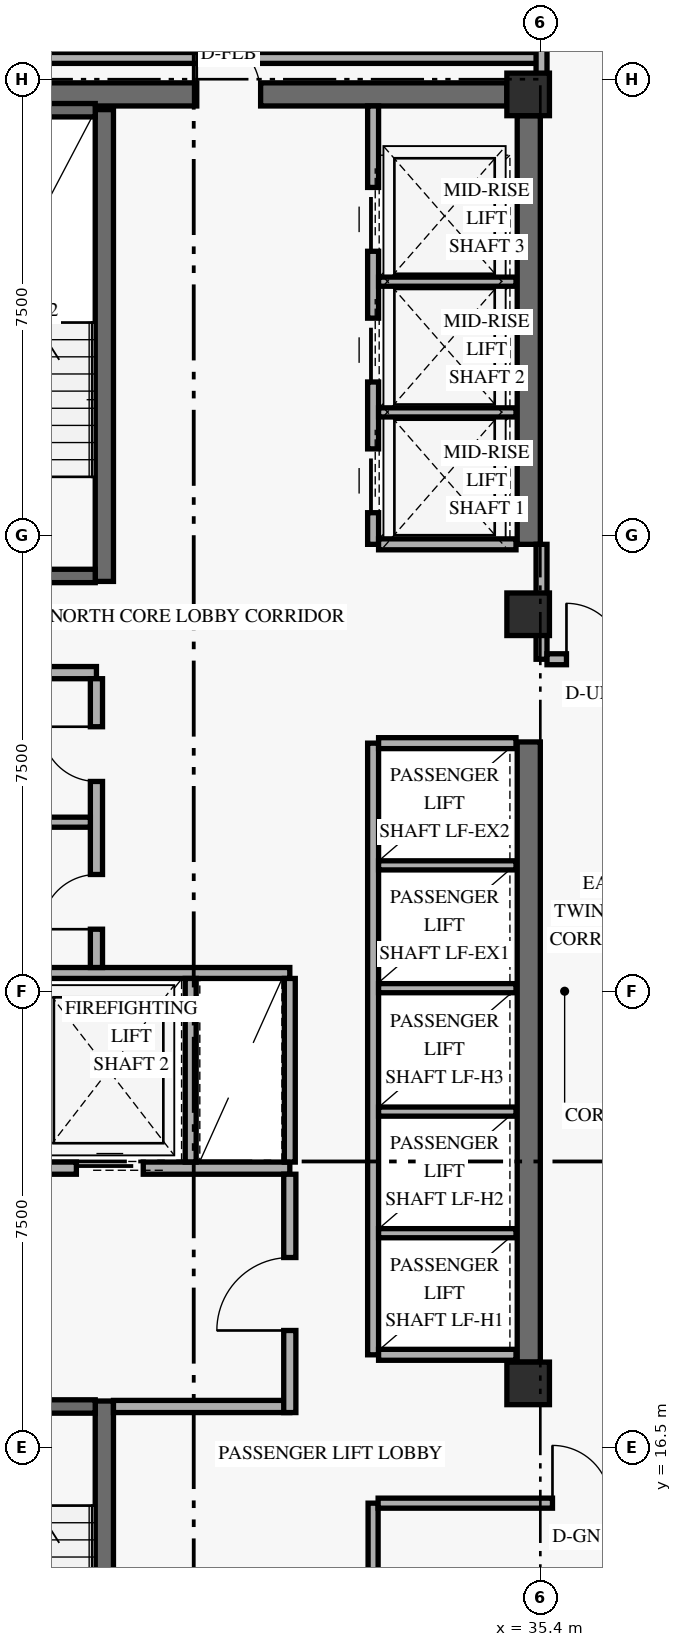
"""IFC4 building model, lengths in metres.
Left out: names, types, materials, properties, quantities, classifications, styles, units other than length and angle.
Written with IfcOpenShell. Run it as: python <this file> out.ifc"""

import sys

from ifc_helpers import new_model, si_unit, direction, frame, frame_2d, origin, origin_2d, place, context, subcontext, project, spatial, rectangle, extrude, element, fill, save


model = new_model("IFC4")
c1 = context("Model", 3, precision=1e-05, world=origin(), true_north=direction((0.0, 1.0)))
c2 = subcontext(c1, "Body", "Model", "MODEL_VIEW")
j1 = project(units=[si_unit("LENGTHUNIT", "METRE"), si_unit("PLANEANGLEUNIT", "RADIAN")], contexts=[c1])
p1 = place(None, origin())
s1 = spatial("IfcSite", under=j1, at=p1, CompositionType="ELEMENT")
p2 = place(p1, origin())
s2 = spatial("IfcBuilding", under=s1, at=p2, CompositionType="ELEMENT")
p3 = place(p2, frame((0.0, 0.0, 148.2)))
s3 = spatial("IfcBuildingStorey", under=s2, at=p3, CompositionType="ELEMENT", Elevation=148.2)
p4 = place(p3, frame((35.21, 17.9, 0.0), z_axis=(0.0, 0.0, 1.0), x_axis=(0.0, 1.0, 0.0)))
e1 = element("IfcWall", 1, at=p4, inside=s3, PredefinedType="SHEAR", context=c2, shape_type="SweptSolid", body=[
    extrude(rectangle(XDim=10.2, YDim=0.38, at=frame_2d((5.1, 0.0))), origin(), (0.0, 0.0, 1.0), 2.748),
])
p5 = place(p3, frame((35.21, 31.35, 0.0), z_axis=(0.0, 0.0, 1.0), x_axis=(0.0, 1.0, 0.0)))
e2 = element("IfcWall", 2, at=p5, inside=s3, PredefinedType="SHEAR", context=c2, shape_type="SweptSolid", body=[
    extrude(rectangle(XDim=7.05, YDim=0.38, at=frame_2d((3.525, 0.0))), origin(), (0.0, 0.0, 1.0), 2.748),
])
p6 = place(p3, frame((24.55, 38.75, 0.0), z_axis=(0.0, 0.0, 1.0), x_axis=(1.0, 0.0, 0.0)))
e3 = element("IfcWall", 3, at=p6, inside=s3, PredefinedType="SHEAR", context=c2, shape_type="SweptSolid", body=[
    extrude(rectangle(XDim=10.3, YDim=0.38, at=frame_2d((5.15, 0.0))), origin(), (0.0, 0.0, 1.0), 3.36),
])
p7 = place(p6, frame((5.2, 0.0, 0.0)))
e4 = element("IfcOpeningElement", 4, at=p7, cuts=e3, PredefinedType="OPENING", context=c2, shape_type="SweptSolid", body=[
    extrude(rectangle(XDim=1.05, YDim=2.15, at=frame_2d((0.525, 1.075))), frame((0.0, 0.2, 0.0), z_axis=(0.0, -1.0, 0.0), x_axis=(1.0, 0.0, 0.0)), (0.0, 0.0, 1.0), 0.4),
])
p8 = place(p3, frame((28.23, 9.5, 0.0), z_axis=(0.0, 0.0, 1.0), x_axis=(0.0, 1.0, 0.0)))
e5 = element("IfcWall", 5, at=p8, inside=s3, PredefinedType="SHEAR", context=c2, shape_type="SweptSolid", body=[
    extrude(rectangle(XDim=7.76, YDim=0.3, at=frame_2d((3.88, 0.0))), origin(), (0.0, 0.0, 1.0), 3.36),
])
p9 = place(p3, frame((24.92, 17.17, 0.0), z_axis=(0.0, 0.0, 1.0), x_axis=(1.0, 0.0, 0.0)))
e6 = element("IfcWall", 6, at=p9, inside=s3, PredefinedType="SHEAR", context=c2, shape_type="SweptSolid", body=[
    extrude(rectangle(XDim=3.16, YDim=0.22, at=frame_2d((1.58, 0.0))), origin(), (0.0, 0.0, 1.0), 3.36),
])
p10 = place(p9, frame((0.78, 0.0, 0.0)))
e7 = element("IfcOpeningElement", 7, at=p10, cuts=e6, PredefinedType="OPENING", context=c2, shape_type="SweptSolid", body=[
    extrude(rectangle(XDim=1.05, YDim=2.15, at=frame_2d((0.525, 1.075))), frame((0.0, 0.12, 0.0), z_axis=(0.0, -1.0, 0.0), x_axis=(1.0, 0.0, 0.0)), (0.0, 0.0, 1.0), 0.24),
])
p11 = place(p3, frame((28.23, 30.74, 0.0), z_axis=(0.0, 0.0, 1.0), x_axis=(0.0, 1.0, 0.0)))
e8 = element("IfcWall", 8, at=p11, inside=s3, PredefinedType="SHEAR", context=c2, shape_type="SweptSolid", body=[
    extrude(rectangle(XDim=7.76, YDim=0.3, at=frame_2d((3.88, 0.0))), origin(), (0.0, 0.0, 1.0), 3.36),
])
p12 = place(p3, frame((24.92, 30.83, 0.0), z_axis=(0.0, 0.0, 1.0), x_axis=(1.0, 0.0, 0.0)))
e9 = element("IfcWall", 9, at=p12, inside=s3, PredefinedType="SHEAR", context=c2, shape_type="SweptSolid", body=[
    extrude(rectangle(XDim=3.16, YDim=0.22, at=frame_2d((1.58, 0.0))), origin(), (0.0, 0.0, 1.0), 3.36),
])
p13 = place(p12, frame((0.78, 0.0, 0.0)))
e10 = element("IfcOpeningElement", 10, at=p13, cuts=e9, PredefinedType="OPENING", context=c2, shape_type="SweptSolid", body=[
    extrude(rectangle(XDim=1.05, YDim=2.15, at=frame_2d((0.525, 1.075))), frame((0.0, 0.12, 0.0), z_axis=(0.0, -1.0, 0.0), x_axis=(1.0, 0.0, 0.0)), (0.0, 0.0, 1.0), 0.24),
])
p14 = place(p3, frame((24.92, 38.49, 0.0), z_axis=(0.0, 0.0, 1.0), x_axis=(1.0, 0.0, 0.0)))
e11 = element("IfcWall", 11, at=p14, inside=s3, PredefinedType="SHEAR", context=c2, shape_type="SweptSolid", body=[
    extrude(rectangle(XDim=3.16, YDim=0.22, at=frame_2d((1.58, 0.0))), origin(), (0.0, 0.0, 1.0), 3.36),
])
for number, where, z_axis, x_axis in (
    (12, (35.2, 17.55, 0.0), (0.0, 0.0, 1.0), (1.0, 0.0, 0.0)),
    (13, (35.2, 30.2, 0.0), (0.0, 0.0, 1.0), (1.0, 0.0, 0.0)),
    (14, (35.2, 38.75, 0.0), (0.0, 0.0, 1.0), (1.0, 0.0, 0.0)),
):
    element("IfcColumn", number, at=place(p3, frame(where, z_axis=z_axis, x_axis=x_axis)), inside=s3, PredefinedType="COLUMN", context=c2, shape_type="SweptSolid", body=[
        extrude(rectangle(XDim=0.7, YDim=0.7, at=origin_2d()), origin(), (0.0, 0.0, 1.0), 3.6),
    ])
p15 = place(p3, frame((24.45, 21.09, 0.0), z_axis=(0.0, 0.0, 1.0), x_axis=(1.0, 0.0, 0.0)))
e15 = element("IfcWall", 15, at=p15, inside=s3, PredefinedType="STANDARD", context=c2, shape_type="SweptSolid", body=[
    extrude(rectangle(XDim=6.83, YDim=0.2, at=frame_2d((3.415, 0.0))), origin(), (0.0, 0.0, 1.0), 3.36),
])
p16 = place(p15, frame((0.72, 0.0, 0.0)))
e16 = element("IfcOpeningElement", 16, at=p16, cuts=e15, PredefinedType="OPENING", context=c2, shape_type="SweptSolid", body=[
    extrude(rectangle(XDim=1.1, YDim=2.2, at=frame_2d((0.55, 1.1))), frame((0.0, 0.11, 0.0), z_axis=(0.0, -1.0, 0.0), x_axis=(1.0, 0.0, 0.0)), (0.0, 0.0, 1.0), 0.22),
])
p17 = place(p15, frame((3.32, 0.0, 0.0)))
e17 = element("IfcOpeningElement", 17, at=p17, cuts=e15, PredefinedType="OPENING", context=c2, shape_type="SweptSolid", body=[
    extrude(rectangle(XDim=1.1, YDim=2.2, at=frame_2d((0.55, 1.1))), frame((0.0, 0.11, 0.0), z_axis=(0.0, -1.0, 0.0), x_axis=(1.0, 0.0, 0.0)), (0.0, 0.0, 1.0), 0.22),
])
p18 = place(p3, frame((28.38, 17.17, 0.0), z_axis=(0.0, 0.0, 1.0), x_axis=(1.0, 0.0, 0.0)))
e18 = element("IfcWall", 18, at=p18, inside=s3, PredefinedType="STANDARD", context=c2, shape_type="SweptSolid", body=[
    extrude(rectangle(XDim=2.9, YDim=0.2, at=frame_2d((1.45, 0.0))), origin(), (0.0, 0.0, 1.0), 3.36),
])
p19 = place(p3, frame((31.28, 17.07, 0.0), z_axis=(0.0, 0.0, 1.0), x_axis=(0.0, 1.0, 0.0)))
e19 = element("IfcWall", 19, at=p19, inside=s3, PredefinedType="STANDARD", context=c2, shape_type="SweptSolid", body=[
    extrude(rectangle(XDim=3.92, YDim=0.2, at=frame_2d((1.96, 0.0))), origin(), (0.0, 0.0, 1.0), 2.73),
])
p20 = place(p19, frame((1.35, 0.0, 0.0)))
e20 = element("IfcOpeningElement", 20, at=p20, cuts=e19, PredefinedType="OPENING", context=c2, shape_type="SweptSolid", body=[
    extrude(rectangle(XDim=1.2, YDim=2.15, at=frame_2d((0.6, 1.075))), frame((0.0, 0.11, 0.0), z_axis=(0.0, -1.0, 0.0), x_axis=(1.0, 0.0, 0.0)), (0.0, 0.0, 1.0), 0.22),
])
p21 = place(p3, frame((24.45, 24.3, 0.0), z_axis=(0.0, 0.0, 1.0), x_axis=(1.0, 0.0, 0.0)))
e21 = element("IfcWall", 21, at=p21, inside=s3, PredefinedType="STANDARD", context=c2, shape_type="SweptSolid", body=[
    extrude(rectangle(XDim=6.83, YDim=0.18, at=frame_2d((3.415, 0.0))), origin(), (0.0, 0.0, 1.0), 3.36),
])
for number, where, z_axis, x_axis in (
    (22, (29.65, 21.19, 0.0), (0.0, 0.0, 1.0), (0.0, 1.0, 0.0)),
    (23, (31.28, 21.19, 0.0), (0.0, 0.0, 1.0), (0.0, 1.0, 0.0)),
):
    element("IfcWall", number, at=place(p3, frame(where, z_axis=z_axis, x_axis=x_axis)), inside=s3, PredefinedType="STANDARD", context=c2, shape_type="SweptSolid", body=[
        extrude(rectangle(XDim=3.02, YDim=0.18, at=frame_2d((1.51, 0.0))), origin(), (0.0, 0.0, 1.0), 3.36),
    ])
p22 = place(p3, frame((24.45, 29.24, 0.0), z_axis=(0.0, 0.0, 1.0), x_axis=(1.0, 0.0, 0.0)))
e24 = element("IfcWall", 24, at=p22, inside=s3, PredefinedType="STANDARD", context=c2, shape_type="SweptSolid", body=[
    extrude(rectangle(XDim=3.65, YDim=0.2, at=frame_2d((1.825, 0.0))), origin(), (0.0, 0.0, 1.0), 3.36),
])
p23 = place(p3, frame((28.1, 24.39, 0.0), z_axis=(0.0, 0.0, 1.0), x_axis=(0.0, 1.0, 0.0)))
e25 = element("IfcWall", 25, at=p23, inside=s3, PredefinedType="STANDARD", context=c2, shape_type="SweptSolid", body=[
    extrude(rectangle(XDim=4.75, YDim=0.2, at=frame_2d((2.375, 0.0))), origin(), (0.0, 0.0, 1.0), 3.36),
])
p24 = place(p23, frame((0.63, 0.0, 0.0)))
e26 = element("IfcOpeningElement", 26, at=p24, cuts=e25, PredefinedType="OPENING", context=c2, shape_type="SweptSolid", body=[
    extrude(rectangle(XDim=0.9, YDim=2.1, at=frame_2d((0.45, 1.05))), frame((0.0, 0.11, 0.0), z_axis=(0.0, -1.0, 0.0), x_axis=(1.0, 0.0, 0.0)), (0.0, 0.0, 1.0), 0.22),
])
p25 = place(p23, frame((3.06, 0.0, 0.0)))
e27 = element("IfcOpeningElement", 27, at=p25, cuts=e25, PredefinedType="OPENING", context=c2, shape_type="SweptSolid", body=[
    extrude(rectangle(XDim=0.9, YDim=2.1, at=frame_2d((0.45, 1.05))), frame((0.0, 0.11, 0.0), z_axis=(0.0, -1.0, 0.0), x_axis=(1.0, 0.0, 0.0)), (0.0, 0.0, 1.0), 0.22),
])
p26 = place(p3, frame((24.45, 26.78, 0.0), z_axis=(0.0, 0.0, 1.0), x_axis=(1.0, 0.0, 0.0)))
e28 = element("IfcWall", 28, at=p26, inside=s3, PredefinedType="PARTITIONING", context=c2, shape_type="SweptSolid", body=[
    extrude(rectangle(XDim=3.55, YDim=0.165, at=frame_2d((1.775, 0.0))), origin(), (0.0, 0.0, 1.0), 3.36),
])
p27 = place(p3, frame((32.65, 18.02, 0.0), z_axis=(0.0, 0.0, 1.0), x_axis=(0.0, 1.0, 0.0)))
e29 = element("IfcWall", 29, at=p27, inside=s3, PredefinedType="STANDARD", context=c2, shape_type="SweptSolid", body=[
    extrude(rectangle(XDim=10.06, YDim=0.18, at=frame_2d((5.03, 0.0))), origin(), (0.0, 0.0, 1.0), 3.36),
])
for number, where, z_axis, x_axis in (
    (30, (32.74, 18.02, 0.0), (0.0, 0.0, 1.0), (1.0, 0.0, 0.0)),
    (31, (32.74, 28.08, 0.0), (0.0, 0.0, 1.0), (1.0, 0.0, 0.0)),
):
    element("IfcWall", number, at=place(p3, frame(where, z_axis=z_axis, x_axis=x_axis)), inside=s3, PredefinedType="STANDARD", context=c2, shape_type="SweptSolid", body=[
        extrude(rectangle(XDim=2.26, YDim=0.18, at=frame_2d((1.13, 0.0))), origin(), (0.0, 0.0, 1.0), 3.36),
    ])
for number, where, z_axis, x_axis in (
    (32, (32.74, 20.02, 0.0), (0.0, 0.0, 1.0), (1.0, 0.0, 0.0)),
    (33, (32.74, 22.02, 0.0), (0.0, 0.0, 1.0), (1.0, 0.0, 0.0)),
    (34, (32.74, 24.05, 0.0), (0.0, 0.0, 1.0), (1.0, 0.0, 0.0)),
    (35, (32.74, 26.07, 0.0), (0.0, 0.0, 1.0), (1.0, 0.0, 0.0)),
):
    element("IfcWall", number, at=place(p3, frame(where, z_axis=z_axis, x_axis=x_axis)), inside=s3, PredefinedType="STANDARD", context=c2, shape_type="SweptSolid", body=[
        extrude(rectangle(XDim=2.26, YDim=0.15, at=frame_2d((1.13, 0.0))), origin(), (0.0, 0.0, 1.0), 3.36),
    ])
p28 = place(p3, frame((32.65, 31.35, 0.0), z_axis=(0.0, 0.0, 1.0), x_axis=(0.0, 1.0, 0.0)))
e36 = element("IfcWall", 36, at=p28, inside=s3, PredefinedType="STANDARD", context=c2, shape_type="SweptSolid", body=[
    extrude(rectangle(XDim=7.21, YDim=0.18, at=frame_2d((3.605, 0.0))), origin(), (0.0, 0.0, 1.0), 3.36),
])
p29 = place(p28, frame((0.52, 0.0, 0.0)))
e37 = element("IfcOpeningElement", 37, at=p29, cuts=e36, PredefinedType="OPENING", context=c2, shape_type="SweptSolid", body=[
    extrude(rectangle(XDim=1.05, YDim=2.2, at=frame_2d((0.525, 1.1))), frame((0.0, 0.1, 0.0), z_axis=(0.0, -1.0, 0.0), x_axis=(1.0, 0.0, 0.0)), (0.0, 0.0, 1.0), 0.2),
])
p30 = place(p28, frame((2.67, 0.0, 0.0)))
e38 = element("IfcOpeningElement", 38, at=p30, cuts=e36, PredefinedType="OPENING", context=c2, shape_type="SweptSolid", body=[
    extrude(rectangle(XDim=1.05, YDim=2.2, at=frame_2d((0.525, 1.1))), frame((0.0, 0.1, 0.0), z_axis=(0.0, -1.0, 0.0), x_axis=(1.0, 0.0, 0.0)), (0.0, 0.0, 1.0), 0.2),
])
p31 = place(p28, frame((4.82, 0.0, 0.0)))
e39 = element("IfcOpeningElement", 39, at=p31, cuts=e36, PredefinedType="OPENING", context=c2, shape_type="SweptSolid", body=[
    extrude(rectangle(XDim=1.05, YDim=2.2, at=frame_2d((0.525, 1.1))), frame((0.0, 0.1, 0.0), z_axis=(0.0, -1.0, 0.0), x_axis=(1.0, 0.0, 0.0)), (0.0, 0.0, 1.0), 0.2),
])
p32 = place(p3, frame((32.74, 31.35, 0.0), z_axis=(0.0, 0.0, 1.0), x_axis=(1.0, 0.0, 0.0)))
e40 = element("IfcWall", 40, at=p32, inside=s3, PredefinedType="STANDARD", context=c2, shape_type="SweptSolid", body=[
    extrude(rectangle(XDim=2.26, YDim=0.18, at=frame_2d((1.13, 0.0))), origin(), (0.0, 0.0, 1.0), 3.36),
])
for number, where, z_axis, x_axis in (
    (41, (32.74, 33.52, 0.0), (0.0, 0.0, 1.0), (1.0, 0.0, 0.0)),
    (42, (32.74, 35.67, 0.0), (0.0, 0.0, 1.0), (1.0, 0.0, 0.0)),
):
    element("IfcWall", number, at=place(p3, frame(where, z_axis=z_axis, x_axis=x_axis)), inside=s3, PredefinedType="STANDARD", context=c2, shape_type="SweptSolid", body=[
        extrude(rectangle(XDim=2.26, YDim=0.15, at=frame_2d((1.13, 0.0))), origin(), (0.0, 0.0, 1.0), 3.36),
    ])
p33 = place(p3, frame((32.65, 9.5, 0.0), z_axis=(0.0, 0.0, 1.0), x_axis=(0.0, 1.0, 0.0)))
e43 = element("IfcWall", 43, at=p33, inside=s3, PredefinedType="PARTITIONING", context=c2, shape_type="SweptSolid", body=[
    extrude(rectangle(XDim=6.08, YDim=0.165, at=frame_2d((3.04, 0.0))), origin(), (0.0, 0.0, 1.0), 3.36),
])
p34 = place(p3, frame((32.732, 15.58, 0.0), z_axis=(0.0, 0.0, 1.0), x_axis=(1.0, 0.0, 0.0)))
e44 = element("IfcWall", 44, at=p34, inside=s3, PredefinedType="PARTITIONING", context=c2, shape_type="SweptSolid", body=[
    extrude(rectangle(XDim=5.618, YDim=0.165, at=frame_2d((2.809, 0.0))), origin(), (0.0, 0.0, 1.0), 2.73),
])
p35 = place(p34, frame((2.867, 0.0, 0.0)))
e45 = element("IfcOpeningElement", 45, at=p35, cuts=e44, PredefinedType="OPENING", context=c2, shape_type="SweptSolid", body=[
    extrude(rectangle(XDim=0.95, YDim=2.15, at=frame_2d((0.475, 1.075))), frame((0.0, 0.093, 0.0), z_axis=(0.0, -1.0, 0.0), x_axis=(1.0, 0.0, 0.0)), (0.0, 0.0, 1.0), 0.185),
])
p36 = place(p3, frame((35.42, 29.46, 0.0), z_axis=(0.0, 0.0, 1.0), x_axis=(0.0, 1.0, 0.0)))
e46 = element("IfcWall", 46, at=p36, inside=s3, PredefinedType="STANDARD", context=c2, shape_type="SweptSolid", body=[
    extrude(rectangle(XDim=1.89, YDim=0.18, at=frame_2d((0.945, 0.0))), origin(), (0.0, 0.0, 1.0), 2.73),
])
p37 = place(p3, frame((35.51, 29.46, 0.0), z_axis=(0.0, 0.0, 1.0), x_axis=(1.0, 0.0, 0.0)))
e47 = element("IfcWall", 47, at=p37, inside=s3, PredefinedType="STANDARD", context=c2, shape_type="SweptSolid", body=[
    extrude(rectangle(XDim=12.49, YDim=0.18, at=frame_2d((6.245, 0.0))), origin(), (0.0, 0.0, 1.0), 2.73),
])
p38 = place(p37, frame((0.32, 0.0, 0.0)))
e48 = element("IfcOpeningElement", 48, at=p38, cuts=e47, PredefinedType="OPENING", context=c2, shape_type="SweptSolid", body=[
    extrude(rectangle(XDim=0.92, YDim=2.15, at=frame_2d((0.46, 1.075))), frame((0.0, 0.1, 0.0), z_axis=(0.0, -1.0, 0.0), x_axis=(1.0, 0.0, 0.0)), (0.0, 0.0, 1.0), 0.2),
])
p39 = place(p3, frame((23.85, 39.35, 0.0), z_axis=(0.0, 0.0, 1.0), x_axis=(1.0, 0.0, 0.0)))
e49 = element("IfcWall", 49, at=p39, inside=s3, PredefinedType="STANDARD", context=c2, shape_type="SweptSolid", body=[
    extrude(rectangle(XDim=11.57, YDim=0.18, at=frame_2d((5.785, 0.0))), origin(), (0.0, 0.0, 1.0), 2.73),
])
p40 = place(p3, frame((35.42, 38.75, 0.0), z_axis=(0.0, 0.0, 1.0), x_axis=(0.0, 1.0, 0.0)))
e50 = element("IfcWall", 50, at=p40, inside=s3, PredefinedType="PARTITIONING", context=c2, shape_type="SweptSolid", body=[
    extrude(rectangle(XDim=4.97, YDim=0.18, at=frame_2d((2.485, 0.0))), origin(), (0.0, 0.0, 1.0), 2.73),
])
p41 = place(p17, origin())
e51 = element("IfcDoor", 51, at=p41, inside=s3, OperationType="SLIDING_TO_LEFT", PredefinedType="DOOR", context=c2, shape_type="SweptSolid", body=[
    extrude(rectangle(XDim=1.1, YDim=2.2, at=frame_2d((0.55, 1.1))), frame((0.0, 0.025, 0.0), z_axis=(0.0, -1.0, 0.0), x_axis=(1.0, 0.0, 0.0)), (0.0, 0.0, 1.0), 0.05),
])
fill(e17, e51)
p42 = place(p20, origin())
e52 = element("IfcDoor", 52, at=p42, inside=s3, OperationType="SINGLE_SWING_LEFT", PredefinedType="DOOR", context=c2, shape_type="SweptSolid", body=[
    extrude(rectangle(XDim=1.2, YDim=2.15, at=frame_2d((0.6, 1.075))), frame((0.0, 0.025, 0.0), z_axis=(0.0, -1.0, 0.0), x_axis=(1.0, 0.0, 0.0)), (0.0, 0.0, 1.0), 0.05),
])
fill(e20, e52)
p43 = place(p24, origin())
e53 = element("IfcDoor", 53, at=p43, inside=s3, OperationType="SINGLE_SWING_LEFT", PredefinedType="DOOR", context=c2, shape_type="SweptSolid", body=[
    extrude(rectangle(XDim=0.9, YDim=2.1, at=frame_2d((0.45, 1.05))), frame((0.0, 0.025, 0.0), z_axis=(0.0, -1.0, 0.0), x_axis=(1.0, 0.0, 0.0)), (0.0, 0.0, 1.0), 0.05),
])
fill(e26, e53)
p44 = place(p25, origin())
e54 = element("IfcDoor", 54, at=p44, inside=s3, OperationType="SINGLE_SWING_RIGHT", PredefinedType="DOOR", context=c2, shape_type="SweptSolid", body=[
    extrude(rectangle(XDim=0.9, YDim=2.1, at=frame_2d((0.45, 1.05))), frame((0.0, 0.025, 0.0), z_axis=(0.0, -1.0, 0.0), x_axis=(1.0, 0.0, 0.0)), (0.0, 0.0, 1.0), 0.05),
])
fill(e27, e54)
p45 = place(p29, origin())
e55 = element("IfcDoor", 55, at=p45, inside=s3, OperationType="SLIDING_TO_LEFT", PredefinedType="DOOR", context=c2, shape_type="SweptSolid", body=[
    extrude(rectangle(XDim=1.05, YDim=2.2, at=frame_2d((0.525, 1.1))), frame((0.0, 0.025, 0.0), z_axis=(0.0, -1.0, 0.0), x_axis=(1.0, 0.0, 0.0)), (0.0, 0.0, 1.0), 0.05),
])
fill(e37, e55)
p46 = place(p30, origin())
e56 = element("IfcDoor", 56, at=p46, inside=s3, OperationType="SLIDING_TO_LEFT", PredefinedType="DOOR", context=c2, shape_type="SweptSolid", body=[
    extrude(rectangle(XDim=1.05, YDim=2.2, at=frame_2d((0.525, 1.1))), frame((0.0, 0.025, 0.0), z_axis=(0.0, -1.0, 0.0), x_axis=(1.0, 0.0, 0.0)), (0.0, 0.0, 1.0), 0.05),
])
fill(e38, e56)
p47 = place(p31, origin())
e57 = element("IfcDoor", 57, at=p47, inside=s3, OperationType="SLIDING_TO_LEFT", PredefinedType="DOOR", context=c2, shape_type="SweptSolid", body=[
    extrude(rectangle(XDim=1.05, YDim=2.2, at=frame_2d((0.525, 1.1))), frame((0.0, 0.025, 0.0), z_axis=(0.0, -1.0, 0.0), x_axis=(1.0, 0.0, 0.0)), (0.0, 0.0, 1.0), 0.05),
])
fill(e39, e57)
p48 = place(p35, origin())
e58 = element("IfcDoor", 58, at=p48, inside=s3, OperationType="SINGLE_SWING_LEFT", PredefinedType="DOOR", context=c2, shape_type="SweptSolid", body=[
    extrude(rectangle(XDim=0.95, YDim=2.15, at=frame_2d((0.475, 1.075))), frame((0.0, 0.025, 0.0), z_axis=(0.0, -1.0, 0.0), x_axis=(1.0, 0.0, 0.0)), (0.0, 0.0, 1.0), 0.05),
])
fill(e45, e58)
p49 = place(p7, frame((1.05, 0.0, 0.0), z_axis=(0.0, 0.0, 1.0), x_axis=(-1.0, 0.0, 0.0)))
e59 = element("IfcDoor", 59, at=p49, inside=s3, OperationType="SINGLE_SWING_RIGHT", PredefinedType="DOOR", context=c2, shape_type="SweptSolid", body=[
    extrude(rectangle(XDim=1.05, YDim=2.15, at=frame_2d((0.525, 1.075))), frame((0.0, 0.025, 0.0), z_axis=(0.0, -1.0, 0.0), x_axis=(1.0, 0.0, 0.0)), (0.0, 0.0, 1.0), 0.05),
])
fill(e4, e59)
p50 = place(p38, origin())
e60 = element("IfcDoor", 60, at=p50, inside=s3, OperationType="SINGLE_SWING_LEFT", PredefinedType="DOOR", context=c2, shape_type="SweptSolid", body=[
    extrude(rectangle(XDim=0.92, YDim=2.15, at=frame_2d((0.46, 1.075))), frame((0.0, 0.025, 0.0), z_axis=(0.0, -1.0, 0.0), x_axis=(1.0, 0.0, 0.0)), (0.0, 0.0, 1.0), 0.05),
])
fill(e48, e60)
save(model, sys.argv[1])
